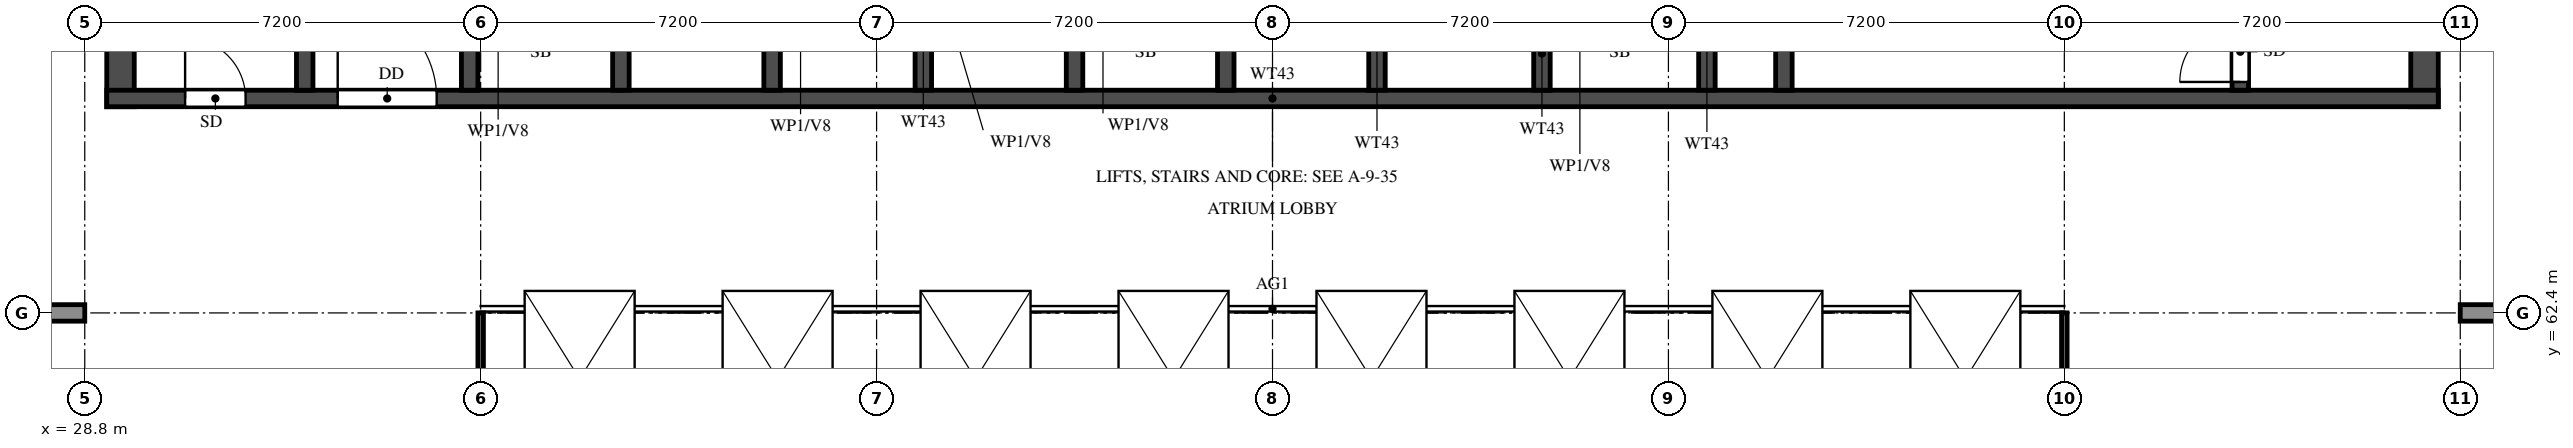
"""IFC4 building model, lengths in metres.
Left out: names, types, materials, properties, quantities, classifications, styles, units other than length and angle.
Written with IfcOpenShell. Run it as: python <this file> out.ifc"""

import sys

from ifc_helpers import new_model, si_unit, direction, frame, frame_2d, origin, origin_2d, place, context, subcontext, project, spatial, rectangle, extrude, element, fill, save


model = new_model("IFC4")
c1 = context("Model", 3, precision=1e-05, world=origin(), true_north=direction((0.0, 1.0)))
c2 = subcontext(c1, "Body", "Model", "MODEL_VIEW")
j1 = project(units=[si_unit("LENGTHUNIT", "METRE"), si_unit("PLANEANGLEUNIT", "RADIAN")], contexts=[c1])
p1 = place(None, origin())
s1 = spatial("IfcSite", under=j1, at=p1, CompositionType="ELEMENT")
p2 = place(p1, origin())
s2 = spatial("IfcBuilding", under=s1, at=p2, CompositionType="ELEMENT")
p3 = place(p2, frame((0.0, 0.0, 274.5)))
s3 = spatial("IfcBuildingStorey", under=s2, at=p3, CompositionType="ELEMENT", Elevation=274.5)
for number, where, z_axis, x_axis in (
    (1, (29.45, 66.15, 0.0), (0.0, 0.0, 1.0), (0.0, 1.0, 0.0)),
    (2, (71.35, 66.15, 0.0), (0.0, 0.0, 1.0), (0.0, 1.0, 0.0)),
):
    element("IfcWall", number, at=place(p3, frame(where, z_axis=z_axis, x_axis=x_axis)), inside=s3, PredefinedType="SHEAR", context=c2, shape_type="SweptSolid", body=[
        extrude(rectangle(XDim=11.85, YDim=0.5, at=frame_2d((5.925, 0.0))), origin(), (0.0, 0.0, 1.0), 7.0),
    ])
p4 = place(p3, frame((29.2, 66.3, 0.0), z_axis=(0.0, 0.0, 1.0), x_axis=(1.0, 0.0, 0.0)))
e3 = element("IfcWall", 3, at=p4, inside=s3, PredefinedType="SHEAR", context=c2, shape_type="SweptSolid", body=[
    extrude(rectangle(XDim=42.4, YDim=0.3, at=frame_2d((21.2, 0.0))), origin(), (0.0, 0.0, 1.0), 7.0),
])
p5 = place(p4, frame((1.425, 0.0, 0.0)))
e4 = element("IfcOpeningElement", 4, at=p5, cuts=e3, PredefinedType="OPENING", context=c2, shape_type="SweptSolid", body=[
    extrude(rectangle(XDim=1.1, YDim=2.1, at=frame_2d((0.55, 1.05))), frame((0.0, 0.16, 0.0), z_axis=(0.0, -1.0, 0.0), x_axis=(1.0, 0.0, 0.0)), (0.0, 0.0, 1.0), 0.32),
])
p6 = place(p4, frame((4.2, 0.0, 0.0)))
e5 = element("IfcOpeningElement", 5, at=p6, cuts=e3, PredefinedType="OPENING", context=c2, shape_type="SweptSolid", body=[
    extrude(rectangle(XDim=1.8, YDim=2.1, at=frame_2d((0.9, 1.05))), frame((0.0, 0.16, 0.0), z_axis=(0.0, -1.0, 0.0), x_axis=(1.0, 0.0, 0.0)), (0.0, 0.0, 1.0), 0.32),
])
p7 = place(p3, frame((32.8, 66.45, 0.0), z_axis=(0.0, 0.0, 1.0), x_axis=(0.0, 1.0, 0.0)))
e6 = element("IfcWall", 6, at=p7, inside=s3, PredefinedType="SHEAR", context=c2, shape_type="SweptSolid", body=[
    extrude(rectangle(XDim=11.05, YDim=0.3, at=frame_2d((5.525, 0.0))), origin(), (0.0, 0.0, 1.0), 7.0),
])
p8 = place(p3, frame((68.0, 66.45, 0.0), z_axis=(0.0, 0.0, 1.0), x_axis=(0.0, 1.0, 0.0)))
e7 = element("IfcWall", 7, at=p8, inside=s3, PredefinedType="SHEAR", context=c2, shape_type="SweptSolid", body=[
    extrude(rectangle(XDim=11.05, YDim=0.3, at=frame_2d((5.525, 0.0))), origin(), (0.0, 0.0, 1.0), 7.0),
])
p9 = place(p8, frame((0.15, 0.0, 0.0)))
e8 = element("IfcOpeningElement", 8, at=p9, cuts=e7, PredefinedType="OPENING", context=c2, shape_type="SweptSolid", body=[
    extrude(rectangle(XDim=1.1, YDim=2.1, at=frame_2d((0.55, 1.05))), frame((0.0, 0.16, 0.0), z_axis=(0.0, -1.0, 0.0), x_axis=(1.0, 0.0, 0.0)), (0.0, 0.0, 1.0), 0.32),
])
p10 = place(p3, frame((59.7, 66.45, 0.0), z_axis=(0.0, 0.0, 1.0), x_axis=(0.0, 1.0, 0.0)))
e9 = element("IfcWall", 9, at=p10, inside=s3, PredefinedType="SHEAR", context=c2, shape_type="SweptSolid", body=[
    extrude(rectangle(XDim=6.175, YDim=0.3, at=frame_2d((3.087, 0.0))), origin(), (0.0, 0.0, 1.0), 7.0),
])
p11 = place(p10, frame((3.85, 0.0, 0.0)))
e10 = element("IfcOpeningElement", 10, at=p11, cuts=e9, PredefinedType="OPENING", context=c2, shape_type="SweptSolid", body=[
    extrude(rectangle(XDim=1.2, YDim=2.1, at=frame_2d((0.6, 1.05))), frame((0.0, 0.16, 0.0), z_axis=(0.0, -1.0, 0.0), x_axis=(1.0, 0.0, 0.0)), (0.0, 0.0, 1.0), 0.32),
])
for number, where, z_axis, x_axis in (
    (11, (35.8, 66.45, 0.0), (0.0, 0.0, 1.0), (0.0, 1.0, 0.0)),
    (12, (38.55, 66.45, 0.0), (0.0, 0.0, 1.0), (0.0, 1.0, 0.0)),
    (13, (41.3, 66.45, 0.0), (0.0, 0.0, 1.0), (0.0, 1.0, 0.0)),
    (14, (44.05, 66.45, 0.0), (0.0, 0.0, 1.0), (0.0, 1.0, 0.0)),
    (15, (46.8, 66.45, 0.0), (0.0, 0.0, 1.0), (0.0, 1.0, 0.0)),
    (16, (49.55, 66.45, 0.0), (0.0, 0.0, 1.0), (0.0, 1.0, 0.0)),
    (17, (52.3, 66.45, 0.0), (0.0, 0.0, 1.0), (0.0, 1.0, 0.0)),
    (18, (55.3, 66.45, 0.0), (0.0, 0.0, 1.0), (0.0, 1.0, 0.0)),
    (19, (58.3, 66.45, 0.0), (0.0, 0.0, 1.0), (0.0, 1.0, 0.0)),
):
    element("IfcWall", number, at=place(p3, frame(where, z_axis=z_axis, x_axis=x_axis)), inside=s3, PredefinedType="SHEAR", context=c2, shape_type="SweptSolid", body=[
        extrude(rectangle(XDim=2.425, YDim=0.3, at=frame_2d((1.212, 0.0))), origin(), (0.0, 0.0, 1.0), 7.0),
    ])
p12 = place(p3, frame((19.0, 62.4, 0.0), z_axis=(0.0, 0.0, 1.0), x_axis=(1.0, 0.0, 0.0)))
e20 = element("IfcWall", 20, at=p12, inside=s3, PredefinedType="SOLIDWALL", context=c2, shape_type="SweptSolid", body=[
    extrude(rectangle(XDim=9.8, YDim=0.3, at=frame_2d((4.9, 0.0))), origin(), (0.0, 0.0, 1.0), 7.0),
])
p13 = place(p12, frame((4.05, 0.0, 0.0)))
e21 = element("IfcOpeningElement", 21, at=p13, cuts=e20, PredefinedType="OPENING", context=c2, shape_type="SweptSolid", body=[
    extrude(rectangle(XDim=1.1, YDim=2.1, at=frame_2d((0.55, 1.05))), frame((0.0, 0.16, 0.0), z_axis=(0.0, -1.0, 0.0), x_axis=(1.0, 0.0, 0.0)), (0.0, 0.0, 1.0), 0.32),
])
p14 = place(p3, frame((72.0, 62.4, 0.0), z_axis=(0.0, 0.0, 1.0), x_axis=(1.0, 0.0, 0.0)))
e22 = element("IfcWall", 22, at=p14, inside=s3, PredefinedType="SOLIDWALL", context=c2, shape_type="SweptSolid", body=[
    extrude(rectangle(XDim=9.8, YDim=0.3, at=frame_2d((4.9, 0.0))), origin(), (0.0, 0.0, 1.0), 7.0),
])
p15 = place(p14, frame((4.65, 0.0, 0.0)))
e23 = element("IfcOpeningElement", 23, at=p15, cuts=e22, PredefinedType="OPENING", context=c2, shape_type="SweptSolid", body=[
    extrude(rectangle(XDim=1.1, YDim=2.1, at=frame_2d((0.55, 1.05))), frame((0.0, 0.16, 0.0), z_axis=(0.0, -1.0, 0.0), x_axis=(1.0, 0.0, 0.0)), (0.0, 0.0, 1.0), 0.32),
])
for number, where, z_axis, x_axis in (
    (24, (36.0, 48.0, 0.0), (0.0, 0.0, 1.0), (0.0, 1.0, 0.0)),
    (25, (64.8, 48.0, 0.0), (0.0, 0.0, 1.0), (0.0, 1.0, 0.0)),
):
    element("IfcWall", number, at=place(p3, frame(where, z_axis=z_axis, x_axis=x_axis)), inside=s3, PredefinedType="PARTITIONING", context=c2, shape_type="SweptSolid", body=[
        extrude(rectangle(XDim=14.4, YDim=0.1, at=frame_2d((7.2, 0.0))), origin(), (0.0, 0.0, 1.0), 7.0),
    ])
p16 = place(p2, frame((0.0, 0.0, 281.5)))
p17 = place(p16, frame((0.0, 0.0, 1.3)))
p18 = place(p17, frame((37.8, 61.2, 0.0)))
p19 = place(p18, frame((0.0, 0.0, 0.15)))
e26 = element("IfcWindow", 26, at=p19, inside=s3, PartitioningType="SINGLE_PANEL", PredefinedType="SKYLIGHT", context=c2, shape_type="SweptSolid", body=[
    extrude(rectangle(XDim=3.2, YDim=2.0, at=origin_2d()), origin(), (0.0, 0.0, 1.0), 0.05),
])
p20 = place(p17, frame((41.4, 61.2, 0.0)))
p21 = place(p20, frame((0.0, 0.0, 0.15)))
e27 = element("IfcWindow", 27, at=p21, inside=s3, PartitioningType="SINGLE_PANEL", PredefinedType="SKYLIGHT", context=c2, shape_type="SweptSolid", body=[
    extrude(rectangle(XDim=3.2, YDim=2.0, at=origin_2d()), origin(), (0.0, 0.0, 1.0), 0.05),
])
p22 = place(p17, frame((45.0, 61.2, 0.0)))
p23 = place(p22, frame((0.0, 0.0, 0.15)))
e28 = element("IfcWindow", 28, at=p23, inside=s3, PartitioningType="SINGLE_PANEL", PredefinedType="SKYLIGHT", context=c2, shape_type="SweptSolid", body=[
    extrude(rectangle(XDim=3.2, YDim=2.0, at=origin_2d()), origin(), (0.0, 0.0, 1.0), 0.05),
])
p24 = place(p17, frame((48.6, 61.2, 0.0)))
p25 = place(p24, frame((0.0, 0.0, 0.15)))
e29 = element("IfcWindow", 29, at=p25, inside=s3, PartitioningType="SINGLE_PANEL", PredefinedType="SKYLIGHT", context=c2, shape_type="SweptSolid", body=[
    extrude(rectangle(XDim=3.2, YDim=2.0, at=origin_2d()), origin(), (0.0, 0.0, 1.0), 0.05),
])
p26 = place(p17, frame((52.2, 61.2, 0.0)))
p27 = place(p26, frame((0.0, 0.0, 0.15)))
e30 = element("IfcWindow", 30, at=p27, inside=s3, PartitioningType="SINGLE_PANEL", PredefinedType="SKYLIGHT", context=c2, shape_type="SweptSolid", body=[
    extrude(rectangle(XDim=3.2, YDim=2.0, at=origin_2d()), origin(), (0.0, 0.0, 1.0), 0.05),
])
p28 = place(p17, frame((55.8, 61.2, 0.0)))
p29 = place(p28, frame((0.0, 0.0, 0.15)))
e31 = element("IfcWindow", 31, at=p29, inside=s3, PartitioningType="SINGLE_PANEL", PredefinedType="SKYLIGHT", context=c2, shape_type="SweptSolid", body=[
    extrude(rectangle(XDim=3.2, YDim=2.0, at=origin_2d()), origin(), (0.0, 0.0, 1.0), 0.05),
])
p30 = place(p17, frame((59.4, 61.2, 0.0)))
p31 = place(p30, frame((0.0, 0.0, 0.15)))
e32 = element("IfcWindow", 32, at=p31, inside=s3, PartitioningType="SINGLE_PANEL", PredefinedType="SKYLIGHT", context=c2, shape_type="SweptSolid", body=[
    extrude(rectangle(XDim=3.2, YDim=2.0, at=origin_2d()), origin(), (0.0, 0.0, 1.0), 0.05),
])
p32 = place(p17, frame((63.0, 61.2, 0.0)))
p33 = place(p32, frame((0.0, 0.0, 0.15)))
e33 = element("IfcWindow", 33, at=p33, inside=s3, PartitioningType="SINGLE_PANEL", PredefinedType="SKYLIGHT", context=c2, shape_type="SweptSolid", body=[
    extrude(rectangle(XDim=3.2, YDim=2.0, at=origin_2d()), origin(), (0.0, 0.0, 1.0), 0.05),
])
p34 = place(p5, origin())
e34 = element("IfcDoor", 34, at=p34, inside=s3, OperationType="SINGLE_SWING_LEFT", PredefinedType="DOOR", context=c2, shape_type="SweptSolid", body=[
    extrude(rectangle(XDim=1.1, YDim=2.1, at=frame_2d((0.55, 1.05))), frame((0.0, 0.025, 0.0), z_axis=(0.0, -1.0, 0.0), x_axis=(1.0, 0.0, 0.0)), (0.0, 0.0, 1.0), 0.05),
])
fill(e4, e34)
p35 = place(p9, origin())
e35 = element("IfcDoor", 35, at=p35, inside=s3, OperationType="SINGLE_SWING_RIGHT", PredefinedType="DOOR", context=c2, shape_type="SweptSolid", body=[
    extrude(rectangle(XDim=1.1, YDim=2.1, at=frame_2d((0.55, 1.05))), frame((0.0, 0.025, 0.0), z_axis=(0.0, -1.0, 0.0), x_axis=(1.0, 0.0, 0.0)), (0.0, 0.0, 1.0), 0.05),
])
fill(e8, e35)
p36 = place(p6, origin())
e36 = element("IfcDoor", 36, at=p36, inside=s3, OperationType="DOUBLE_DOOR_SINGLE_SWING", PredefinedType="DOOR", context=c2, shape_type="SweptSolid", body=[
    extrude(rectangle(XDim=1.8, YDim=2.1, at=frame_2d((0.9, 1.05))), frame((0.0, 0.025, 0.0), z_axis=(0.0, -1.0, 0.0), x_axis=(1.0, 0.0, 0.0)), (0.0, 0.0, 1.0), 0.05),
])
fill(e5, e36)
save(model, sys.argv[1])
